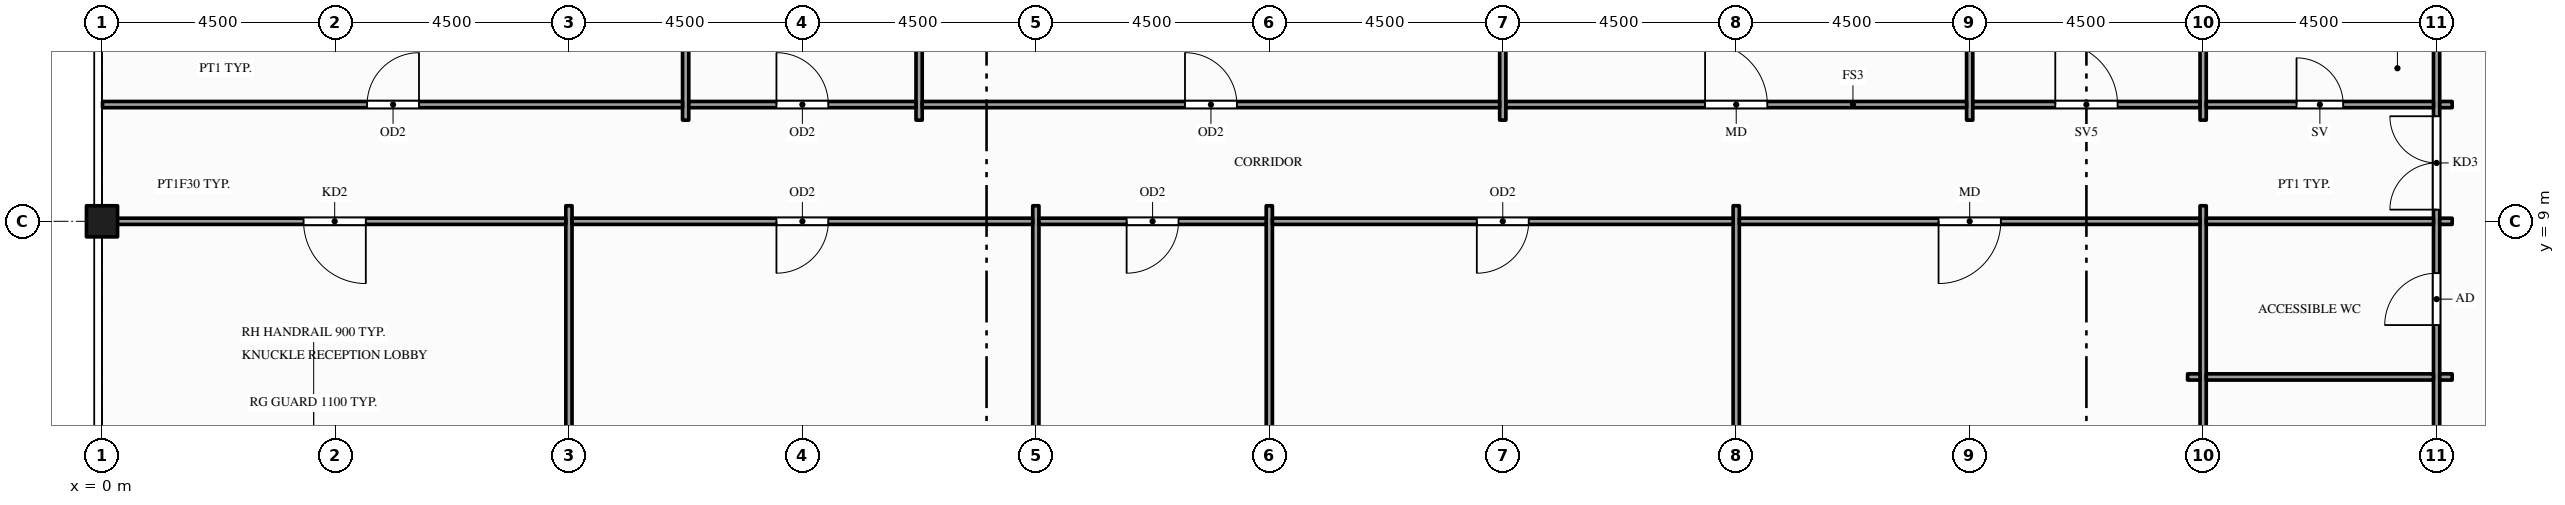
"""IFC4 building model, lengths in metres.
Left out: names, types, materials, properties, quantities, classifications, styles, units other than length and angle.
Written with IfcOpenShell. Run it as: python <this file> out.ifc"""

import sys

from ifc_helpers import new_model, si_unit, direction, frame, frame_2d, origin, origin_2d, place, context, subcontext, project, spatial, rectangle, hollow_rectangle, extrude, element, fill, save


model = new_model("IFC4")
c1 = context("Model", 3, precision=1e-05, world=origin(), true_north=direction((0.0, 1.0)))
c2 = subcontext(c1, "Body", "Model", "MODEL_VIEW")
j1 = project(units=[si_unit("LENGTHUNIT", "METRE"), si_unit("PLANEANGLEUNIT", "RADIAN")], contexts=[c1])
p1 = place(None, origin())
s1 = spatial("IfcSite", under=j1, at=p1, CompositionType="ELEMENT")
p2 = place(p1, origin())
s2 = spatial("IfcBuilding", under=s1, at=p2, CompositionType="ELEMENT")
p3 = place(p2, frame((0.0, 0.0, 305.0)))
s3 = spatial("IfcBuildingStorey", under=s2, at=p3, CompositionType="ELEMENT", Elevation=305.0)
p4 = place(p3, frame((0.0, 9.0, -0.15), z_axis=(0.0, 0.0, 1.0), x_axis=(1.0, 0.0, 0.0)))
e1 = element("IfcColumn", 1, at=p4, inside=s3, PredefinedType="COLUMN", context=c2, shape_type="SweptSolid", body=[
    extrude(hollow_rectangle(XDim=0.6, YDim=0.6, WallThickness=0.03, at=origin_2d()), origin(), (0.0, 0.0, 1.0), 4.5),
])
p5 = place(p3, frame((9.0, 3.875, 0.0), z_axis=(0.0, 0.0, 1.0), x_axis=(0.0, 1.0, 0.0)))
e2 = element("IfcWall", 2, at=p5, inside=s3, PredefinedType="PARTITIONING", context=c2, shape_type="SweptSolid", body=[
    extrude(rectangle(XDim=5.425, YDim=0.12, at=frame_2d((2.712, 0.0))), origin(), (0.0, 0.0, 1.0), 3.359),
])
for number, where, z_axis, x_axis in (
    (3, (11.25, 10.95, 0.0), (0.0, 0.0, 1.0), (0.0, 1.0, 0.0)),
    (4, (15.75, 10.95, 0.0), (0.0, 0.0, 1.0), (0.0, 1.0, 0.0)),
):
    element("IfcWall", number, at=place(p3, frame(where, z_axis=z_axis, x_axis=x_axis)), inside=s3, PredefinedType="PARTITIONING", context=c2, shape_type="SweptSolid", body=[
        extrude(rectangle(XDim=11.54, YDim=0.12, at=frame_2d((5.77, 0.0))), origin(), (0.0, 0.0, 1.0), 3.359),
    ])
for number, where, z_axis, x_axis in (
    (5, (18.0, 0.01, 0.0), (0.0, 0.0, 1.0), (0.0, 1.0, 0.0)),
    (6, (22.5, 0.01, 0.0), (0.0, 0.0, 1.0), (0.0, 1.0, 0.0)),
):
    element("IfcWall", number, at=place(p3, frame(where, z_axis=z_axis, x_axis=x_axis)), inside=s3, PredefinedType="PARTITIONING", context=c2, shape_type="SweptSolid", body=[
        extrude(rectangle(XDim=9.29, YDim=0.12, at=frame_2d((4.645, 0.0))), origin(), (0.0, 0.0, 1.0), 3.359),
    ])
p6 = place(p3, frame((27.0, 10.95, 0.0), z_axis=(0.0, 0.0, 1.0), x_axis=(0.0, 1.0, 0.0)))
e7 = element("IfcWall", 7, at=p6, inside=s3, PredefinedType="PARTITIONING", context=c2, shape_type="SweptSolid", body=[
    extrude(rectangle(XDim=11.54, YDim=0.12, at=frame_2d((5.77, 0.0))), origin(), (0.0, 0.0, 1.0), 3.359),
])
p7 = place(p3, frame((31.5, 0.01, 0.0), z_axis=(0.0, 0.0, 1.0), x_axis=(0.0, 1.0, 0.0)))
e8 = element("IfcWall", 8, at=p7, inside=s3, PredefinedType="PARTITIONING", context=c2, shape_type="SweptSolid", body=[
    extrude(rectangle(XDim=9.29, YDim=0.12, at=frame_2d((4.645, 0.0))), origin(), (0.0, 0.0, 1.0), 3.359),
])
p8 = place(p3, frame((36.0, 10.95, 0.0), z_axis=(0.0, 0.0, 1.0), x_axis=(0.0, 1.0, 0.0)))
e9 = element("IfcWall", 9, at=p8, inside=s3, PredefinedType="PARTITIONING", context=c2, shape_type="SweptSolid", body=[
    extrude(rectangle(XDim=11.54, YDim=0.12, at=frame_2d((5.77, 0.0))), origin(), (0.0, 0.0, 1.0), 3.359),
])
p9 = place(p3, frame((40.5, 0.01, 0.0), z_axis=(0.0, 0.0, 1.0), x_axis=(0.0, 1.0, 0.0)))
e10 = element("IfcWall", 10, at=p9, inside=s3, PredefinedType="PARTITIONING", context=c2, shape_type="SweptSolid", body=[
    extrude(rectangle(XDim=9.29, YDim=0.12, at=frame_2d((4.645, 0.0))), origin(), (0.0, 0.0, 1.0), 3.359),
])
p10 = place(p3, frame((40.5, 10.95, 0.0), z_axis=(0.0, 0.0, 1.0), x_axis=(0.0, 1.0, 0.0)))
e11 = element("IfcWall", 11, at=p10, inside=s3, PredefinedType="PARTITIONING", context=c2, shape_type="SweptSolid", body=[
    extrude(rectangle(XDim=11.54, YDim=0.12, at=frame_2d((5.77, 0.0))), origin(), (0.0, 0.0, 1.0), 3.359),
])
p11 = place(p3, frame((45.0, 0.01, 0.0), z_axis=(0.0, 0.0, 1.0), x_axis=(0.0, 1.0, 0.0)))
e12 = element("IfcWall", 12, at=p11, inside=s3, PredefinedType="PARTITIONING", context=c2, shape_type="SweptSolid", body=[
    extrude(rectangle(XDim=22.48, YDim=0.12, at=frame_2d((11.24, 0.0))), origin(), (0.0, 0.0, 1.0), 3.359),
])
p12 = place(p11, frame((9.215, 0.0, 0.0)))
e13 = element("IfcOpeningElement", 13, at=p12, cuts=e12, PredefinedType="OPENING", context=c2, shape_type="SweptSolid", body=[
    extrude(rectangle(XDim=1.8, YDim=2.1, at=frame_2d((0.9, 1.05))), frame((0.0, 0.07, 0.0), z_axis=(0.0, -1.0, 0.0), x_axis=(1.0, 0.0, 0.0)), (0.0, 0.0, 1.0), 0.14),
])
p13 = place(p11, frame((0.99, 0.0, 0.0)))
e14 = element("IfcOpeningElement", 14, at=p13, cuts=e12, PredefinedType="OPENING", context=c2, shape_type="SweptSolid", body=[
    extrude(rectangle(XDim=0.9, YDim=2.1, at=frame_2d((0.45, 1.05))), frame((0.0, 0.07, 0.0), z_axis=(0.0, -1.0, 0.0), x_axis=(1.0, 0.0, 0.0)), (0.0, 0.0, 1.0), 0.14),
])
p14 = place(p11, frame((4.04, 0.0, 0.0)))
e15 = element("IfcOpeningElement", 15, at=p14, cuts=e12, PredefinedType="OPENING", context=c2, shape_type="SweptSolid", body=[
    extrude(rectangle(XDim=0.9, YDim=2.1, at=frame_2d((0.45, 1.05))), frame((0.0, 0.07, 0.0), z_axis=(0.0, -1.0, 0.0), x_axis=(1.0, 0.0, 0.0)), (0.0, 0.0, 1.0), 0.14),
])
p15 = place(p11, frame((6.99, 0.0, 0.0)))
e16 = element("IfcOpeningElement", 16, at=p15, cuts=e12, PredefinedType="OPENING", context=c2, shape_type="SweptSolid", body=[
    extrude(rectangle(XDim=1.0, YDim=2.1, at=frame_2d((0.5, 1.05))), frame((0.0, 0.07, 0.0), z_axis=(0.0, -1.0, 0.0), x_axis=(1.0, 0.0, 0.0)), (0.0, 0.0, 1.0), 0.14),
])
p16 = place(p3, frame((40.2, 6.0, 0.0), z_axis=(0.0, 0.0, 1.0), x_axis=(1.0, 0.0, 0.0)))
e17 = element("IfcWall", 17, at=p16, inside=s3, PredefinedType="PARTITIONING", context=c2, shape_type="SweptSolid", body=[
    extrude(rectangle(XDim=0.24, YDim=0.12, at=frame_2d((0.12, 0.0))), origin(), (0.0, 0.0, 1.0), 3.359),
])
p17 = place(p3, frame((40.56, 6.0, 0.0), z_axis=(0.0, 0.0, 1.0), x_axis=(1.0, 0.0, 0.0)))
e18 = element("IfcWall", 18, at=p17, inside=s3, PredefinedType="PARTITIONING", context=c2, shape_type="SweptSolid", body=[
    extrude(rectangle(XDim=4.38, YDim=0.12, at=frame_2d((2.19, 0.0))), origin(), (0.0, 0.0, 1.0), 3.359),
])
p18 = place(p3, frame((45.06, 6.0, 0.0), z_axis=(0.0, 0.0, 1.0), x_axis=(1.0, 0.0, 0.0)))
e19 = element("IfcWall", 19, at=p18, inside=s3, PredefinedType="PARTITIONING", context=c2, shape_type="SweptSolid", body=[
    extrude(rectangle(XDim=0.24, YDim=0.12, at=frame_2d((0.12, 0.0))), origin(), (0.0, 0.0, 1.0), 3.359),
])
p19 = place(p3, frame((0.01, 9.0, 0.0), z_axis=(0.0, 0.0, 1.0), x_axis=(1.0, 0.0, 0.0)))
e20 = element("IfcWall", 20, at=p19, inside=s3, PredefinedType="PARTITIONING", context=c2, shape_type="SweptSolid", body=[
    extrude(rectangle(XDim=8.93, YDim=0.12, at=frame_2d((4.465, 0.0))), origin(), (0.0, 0.0, 1.0), 3.359),
])
p20 = place(p19, frame((3.875, 0.0, 0.0)))
e21 = element("IfcOpeningElement", 21, at=p20, cuts=e20, PredefinedType="OPENING", context=c2, shape_type="SweptSolid", body=[
    extrude(rectangle(XDim=1.2, YDim=2.1, at=frame_2d((0.6, 1.05))), frame((0.0, 0.07, 0.0), z_axis=(0.0, -1.0, 0.0), x_axis=(1.0, 0.0, 0.0)), (0.0, 0.0, 1.0), 0.14),
])
p21 = place(p3, frame((9.06, 9.0, 0.0), z_axis=(0.0, 0.0, 1.0), x_axis=(1.0, 0.0, 0.0)))
e22 = element("IfcWall", 22, at=p21, inside=s3, PredefinedType="PARTITIONING", context=c2, shape_type="SweptSolid", body=[
    extrude(rectangle(XDim=8.88, YDim=0.12, at=frame_2d((4.44, 0.0))), origin(), (0.0, 0.0, 1.0), 3.359),
])
p22 = place(p21, frame((3.94, 0.0, 0.0)))
e23 = element("IfcOpeningElement", 23, at=p22, cuts=e22, PredefinedType="OPENING", context=c2, shape_type="SweptSolid", body=[
    extrude(rectangle(XDim=1.0, YDim=2.1, at=frame_2d((0.5, 1.05))), frame((0.0, 0.07, 0.0), z_axis=(0.0, -1.0, 0.0), x_axis=(1.0, 0.0, 0.0)), (0.0, 0.0, 1.0), 0.14),
])
p23 = place(p3, frame((18.06, 9.0, 0.0), z_axis=(0.0, 0.0, 1.0), x_axis=(1.0, 0.0, 0.0)))
e24 = element("IfcWall", 24, at=p23, inside=s3, PredefinedType="PARTITIONING", context=c2, shape_type="SweptSolid", body=[
    extrude(rectangle(XDim=4.38, YDim=0.12, at=frame_2d((2.19, 0.0))), origin(), (0.0, 0.0, 1.0), 3.359),
])
p24 = place(p23, frame((1.69, 0.0, 0.0)))
e25 = element("IfcOpeningElement", 25, at=p24, cuts=e24, PredefinedType="OPENING", context=c2, shape_type="SweptSolid", body=[
    extrude(rectangle(XDim=1.0, YDim=2.1, at=frame_2d((0.5, 1.05))), frame((0.0, 0.07, 0.0), z_axis=(0.0, -1.0, 0.0), x_axis=(1.0, 0.0, 0.0)), (0.0, 0.0, 1.0), 0.14),
])
p25 = place(p3, frame((22.56, 9.0, 0.0), z_axis=(0.0, 0.0, 1.0), x_axis=(1.0, 0.0, 0.0)))
e26 = element("IfcWall", 26, at=p25, inside=s3, PredefinedType="PARTITIONING", context=c2, shape_type="SweptSolid", body=[
    extrude(rectangle(XDim=8.88, YDim=0.12, at=frame_2d((4.44, 0.0))), origin(), (0.0, 0.0, 1.0), 3.359),
])
p26 = place(p25, frame((3.94, 0.0, 0.0)))
e27 = element("IfcOpeningElement", 27, at=p26, cuts=e26, PredefinedType="OPENING", context=c2, shape_type="SweptSolid", body=[
    extrude(rectangle(XDim=1.0, YDim=2.1, at=frame_2d((0.5, 1.05))), frame((0.0, 0.07, 0.0), z_axis=(0.0, -1.0, 0.0), x_axis=(1.0, 0.0, 0.0)), (0.0, 0.0, 1.0), 0.14),
])
p27 = place(p3, frame((31.56, 9.0, 0.0), z_axis=(0.0, 0.0, 1.0), x_axis=(1.0, 0.0, 0.0)))
e28 = element("IfcWall", 28, at=p27, inside=s3, PredefinedType="PARTITIONING", context=c2, shape_type="SweptSolid", body=[
    extrude(rectangle(XDim=8.88, YDim=0.12, at=frame_2d((4.44, 0.0))), origin(), (0.0, 0.0, 1.0), 3.359),
])
p28 = place(p27, frame((3.84, 0.0, 0.0)))
e29 = element("IfcOpeningElement", 29, at=p28, cuts=e28, PredefinedType="OPENING", context=c2, shape_type="SweptSolid", body=[
    extrude(rectangle(XDim=1.2, YDim=2.1, at=frame_2d((0.6, 1.05))), frame((0.0, 0.07, 0.0), z_axis=(0.0, -1.0, 0.0), x_axis=(1.0, 0.0, 0.0)), (0.0, 0.0, 1.0), 0.14),
])
p29 = place(p3, frame((40.56, 9.0, 0.0), z_axis=(0.0, 0.0, 1.0), x_axis=(1.0, 0.0, 0.0)))
e30 = element("IfcWall", 30, at=p29, inside=s3, PredefinedType="PARTITIONING", context=c2, shape_type="SweptSolid", body=[
    extrude(rectangle(XDim=4.38, YDim=0.12, at=frame_2d((2.19, 0.0))), origin(), (0.0, 0.0, 1.0), 3.359),
])
p30 = place(p3, frame((45.06, 9.0, 0.0), z_axis=(0.0, 0.0, 1.0), x_axis=(1.0, 0.0, 0.0)))
e31 = element("IfcWall", 31, at=p30, inside=s3, PredefinedType="PARTITIONING", context=c2, shape_type="SweptSolid", body=[
    extrude(rectangle(XDim=0.24, YDim=0.12, at=frame_2d((0.12, 0.0))), origin(), (0.0, 0.0, 1.0), 3.359),
])
p31 = place(p3, frame((0.01, 11.25, 0.0), z_axis=(0.0, 0.0, 1.0), x_axis=(1.0, 0.0, 0.0)))
e32 = element("IfcWall", 32, at=p31, inside=s3, PredefinedType="PARTITIONING", context=c2, shape_type="SweptSolid", body=[
    extrude(rectangle(XDim=11.18, YDim=0.12, at=frame_2d((5.59, 0.0))), origin(), (0.0, 0.0, 1.0), 3.359),
])
p32 = place(p31, frame((5.1, 0.0, 0.0)))
e33 = element("IfcOpeningElement", 33, at=p32, cuts=e32, PredefinedType="OPENING", context=c2, shape_type="SweptSolid", body=[
    extrude(rectangle(XDim=1.0, YDim=2.1, at=frame_2d((0.5, 1.05))), frame((0.0, 0.07, 0.0), z_axis=(0.0, -1.0, 0.0), x_axis=(1.0, 0.0, 0.0)), (0.0, 0.0, 1.0), 0.14),
])
p33 = place(p3, frame((11.31, 11.25, 0.0), z_axis=(0.0, 0.0, 1.0), x_axis=(1.0, 0.0, 0.0)))
e34 = element("IfcWall", 34, at=p33, inside=s3, PredefinedType="PARTITIONING", context=c2, shape_type="SweptSolid", body=[
    extrude(rectangle(XDim=4.38, YDim=0.12, at=frame_2d((2.19, 0.0))), origin(), (0.0, 0.0, 1.0), 3.359),
])
p34 = place(p33, frame((1.69, 0.0, 0.0)))
e35 = element("IfcOpeningElement", 35, at=p34, cuts=e34, PredefinedType="OPENING", context=c2, shape_type="SweptSolid", body=[
    extrude(rectangle(XDim=1.0, YDim=2.1, at=frame_2d((0.5, 1.05))), frame((0.0, 0.07, 0.0), z_axis=(0.0, -1.0, 0.0), x_axis=(1.0, 0.0, 0.0)), (0.0, 0.0, 1.0), 0.14),
])
p35 = place(p3, frame((15.81, 11.25, 0.0), z_axis=(0.0, 0.0, 1.0), x_axis=(1.0, 0.0, 0.0)))
e36 = element("IfcWall", 36, at=p35, inside=s3, PredefinedType="PARTITIONING", context=c2, shape_type="SweptSolid", body=[
    extrude(rectangle(XDim=11.13, YDim=0.12, at=frame_2d((5.565, 0.0))), origin(), (0.0, 0.0, 1.0), 3.359),
])
p36 = place(p35, frame((5.065, 0.0, 0.0)))
e37 = element("IfcOpeningElement", 37, at=p36, cuts=e36, PredefinedType="OPENING", context=c2, shape_type="SweptSolid", body=[
    extrude(rectangle(XDim=1.0, YDim=2.1, at=frame_2d((0.5, 1.05))), frame((0.0, 0.07, 0.0), z_axis=(0.0, -1.0, 0.0), x_axis=(1.0, 0.0, 0.0)), (0.0, 0.0, 1.0), 0.14),
])
p37 = place(p3, frame((27.06, 11.25, 0.0), z_axis=(0.0, 0.0, 1.0), x_axis=(1.0, 0.0, 0.0)))
e38 = element("IfcWall", 38, at=p37, inside=s3, PredefinedType="PARTITIONING", context=c2, shape_type="SweptSolid", body=[
    extrude(rectangle(XDim=8.88, YDim=0.12, at=frame_2d((4.44, 0.0))), origin(), (0.0, 0.0, 1.0), 3.359),
])
p38 = place(p37, frame((3.84, 0.0, 0.0)))
e39 = element("IfcOpeningElement", 39, at=p38, cuts=e38, PredefinedType="OPENING", context=c2, shape_type="SweptSolid", body=[
    extrude(rectangle(XDim=1.2, YDim=2.1, at=frame_2d((0.6, 1.05))), frame((0.0, 0.07, 0.0), z_axis=(0.0, -1.0, 0.0), x_axis=(1.0, 0.0, 0.0)), (0.0, 0.0, 1.0), 0.14),
])
p39 = place(p3, frame((36.06, 11.25, 0.0), z_axis=(0.0, 0.0, 1.0), x_axis=(1.0, 0.0, 0.0)))
e40 = element("IfcWall", 40, at=p39, inside=s3, PredefinedType="PARTITIONING", context=c2, shape_type="SweptSolid", body=[
    extrude(rectangle(XDim=4.38, YDim=0.12, at=frame_2d((2.19, 0.0))), origin(), (0.0, 0.0, 1.0), 3.359),
])
p40 = place(p39, frame((1.59, 0.0, 0.0)))
e41 = element("IfcOpeningElement", 41, at=p40, cuts=e40, PredefinedType="OPENING", context=c2, shape_type="SweptSolid", body=[
    extrude(rectangle(XDim=1.2, YDim=2.1, at=frame_2d((0.6, 1.05))), frame((0.0, 0.07, 0.0), z_axis=(0.0, -1.0, 0.0), x_axis=(1.0, 0.0, 0.0)), (0.0, 0.0, 1.0), 0.14),
])
p41 = place(p3, frame((40.56, 11.25, 0.0), z_axis=(0.0, 0.0, 1.0), x_axis=(1.0, 0.0, 0.0)))
e42 = element("IfcWall", 42, at=p41, inside=s3, PredefinedType="PARTITIONING", context=c2, shape_type="SweptSolid", body=[
    extrude(rectangle(XDim=4.38, YDim=0.12, at=frame_2d((2.19, 0.0))), origin(), (0.0, 0.0, 1.0), 3.359),
])
p42 = place(p41, frame((1.74, 0.0, 0.0)))
e43 = element("IfcOpeningElement", 43, at=p42, cuts=e42, PredefinedType="OPENING", context=c2, shape_type="SweptSolid", body=[
    extrude(rectangle(XDim=0.9, YDim=2.1, at=frame_2d((0.45, 1.05))), frame((0.0, 0.07, 0.0), z_axis=(0.0, -1.0, 0.0), x_axis=(1.0, 0.0, 0.0)), (0.0, 0.0, 1.0), 0.14),
])
p43 = place(p3, frame((45.06, 11.25, 0.0), z_axis=(0.0, 0.0, 1.0), x_axis=(1.0, 0.0, 0.0)))
e44 = element("IfcWall", 44, at=p43, inside=s3, PredefinedType="PARTITIONING", context=c2, shape_type="SweptSolid", body=[
    extrude(rectangle(XDim=0.24, YDim=0.12, at=frame_2d((0.12, 0.0))), origin(), (0.0, 0.0, 1.0), 3.359),
])
p44 = place(p12, origin())
e45 = element("IfcDoor", 45, at=p44, inside=s3, OperationType="DOUBLE_DOOR_SINGLE_SWING", PredefinedType="DOOR", context=c2, shape_type="SweptSolid", body=[
    extrude(rectangle(XDim=1.8, YDim=2.1, at=frame_2d((0.9, 1.05))), frame((0.0, 0.025, 0.0), z_axis=(0.0, -1.0, 0.0), x_axis=(1.0, 0.0, 0.0)), (0.0, 0.0, 1.0), 0.05),
])
fill(e13, e45)
p45 = place(p20, origin())
e46 = element("IfcDoor", 46, at=p45, inside=s3, OperationType="SINGLE_SWING_RIGHT", PredefinedType="DOOR", context=c2, shape_type="SweptSolid", body=[
    extrude(rectangle(XDim=1.2, YDim=2.1, at=frame_2d((0.6, 1.05))), frame((0.0, 0.025, 0.0), z_axis=(0.0, -1.0, 0.0), x_axis=(1.0, 0.0, 0.0)), (0.0, 0.0, 1.0), 0.05),
])
fill(e21, e46)
p46 = place(p22, origin())
e47 = element("IfcDoor", 47, at=p46, inside=s3, OperationType="SINGLE_SWING_LEFT", PredefinedType="DOOR", context=c2, shape_type="SweptSolid", body=[
    extrude(rectangle(XDim=1.0, YDim=2.1, at=frame_2d((0.5, 1.05))), frame((0.0, 0.025, 0.0), z_axis=(0.0, -1.0, 0.0), x_axis=(1.0, 0.0, 0.0)), (0.0, 0.0, 1.0), 0.05),
])
fill(e23, e47)
p47 = place(p24, origin())
e48 = element("IfcDoor", 48, at=p47, inside=s3, OperationType="SINGLE_SWING_LEFT", PredefinedType="DOOR", context=c2, shape_type="SweptSolid", body=[
    extrude(rectangle(XDim=1.0, YDim=2.1, at=frame_2d((0.5, 1.05))), frame((0.0, 0.025, 0.0), z_axis=(0.0, -1.0, 0.0), x_axis=(1.0, 0.0, 0.0)), (0.0, 0.0, 1.0), 0.05),
])
fill(e25, e48)
p48 = place(p26, origin())
e49 = element("IfcDoor", 49, at=p48, inside=s3, OperationType="SINGLE_SWING_LEFT", PredefinedType="DOOR", context=c2, shape_type="SweptSolid", body=[
    extrude(rectangle(XDim=1.0, YDim=2.1, at=frame_2d((0.5, 1.05))), frame((0.0, 0.025, 0.0), z_axis=(0.0, -1.0, 0.0), x_axis=(1.0, 0.0, 0.0)), (0.0, 0.0, 1.0), 0.05),
])
fill(e27, e49)
p49 = place(p28, origin())
e50 = element("IfcDoor", 50, at=p49, inside=s3, OperationType="SINGLE_SWING_LEFT", PredefinedType="DOOR", context=c2, shape_type="SweptSolid", body=[
    extrude(rectangle(XDim=1.2, YDim=2.1, at=frame_2d((0.6, 1.05))), frame((0.0, 0.025, 0.0), z_axis=(0.0, -1.0, 0.0), x_axis=(1.0, 0.0, 0.0)), (0.0, 0.0, 1.0), 0.05),
])
fill(e29, e50)
p50 = place(p15, origin())
e51 = element("IfcDoor", 51, at=p50, inside=s3, OperationType="SINGLE_SWING_LEFT", PredefinedType="DOOR", context=c2, shape_type="SweptSolid", body=[
    extrude(rectangle(XDim=1.0, YDim=2.1, at=frame_2d((0.5, 1.05))), frame((0.0, 0.025, 0.0), z_axis=(0.0, -1.0, 0.0), x_axis=(1.0, 0.0, 0.0)), (0.0, 0.0, 1.0), 0.05),
])
fill(e16, e51)
p51 = place(p32, origin())
e52 = element("IfcDoor", 52, at=p51, inside=s3, OperationType="SINGLE_SWING_RIGHT", PredefinedType="DOOR", context=c2, shape_type="SweptSolid", body=[
    extrude(rectangle(XDim=1.0, YDim=2.1, at=frame_2d((0.5, 1.05))), frame((0.0, 0.025, 0.0), z_axis=(0.0, -1.0, 0.0), x_axis=(1.0, 0.0, 0.0)), (0.0, 0.0, 1.0), 0.05),
])
fill(e33, e52)
p52 = place(p34, origin())
e53 = element("IfcDoor", 53, at=p52, inside=s3, OperationType="SINGLE_SWING_LEFT", PredefinedType="DOOR", context=c2, shape_type="SweptSolid", body=[
    extrude(rectangle(XDim=1.0, YDim=2.1, at=frame_2d((0.5, 1.05))), frame((0.0, 0.025, 0.0), z_axis=(0.0, -1.0, 0.0), x_axis=(1.0, 0.0, 0.0)), (0.0, 0.0, 1.0), 0.05),
])
fill(e35, e53)
p53 = place(p36, origin())
e54 = element("IfcDoor", 54, at=p53, inside=s3, OperationType="SINGLE_SWING_LEFT", PredefinedType="DOOR", context=c2, shape_type="SweptSolid", body=[
    extrude(rectangle(XDim=1.0, YDim=2.1, at=frame_2d((0.5, 1.05))), frame((0.0, 0.025, 0.0), z_axis=(0.0, -1.0, 0.0), x_axis=(1.0, 0.0, 0.0)), (0.0, 0.0, 1.0), 0.05),
])
fill(e37, e54)
p54 = place(p38, origin())
e55 = element("IfcDoor", 55, at=p54, inside=s3, OperationType="SINGLE_SWING_LEFT", PredefinedType="DOOR", context=c2, shape_type="SweptSolid", body=[
    extrude(rectangle(XDim=1.2, YDim=2.1, at=frame_2d((0.6, 1.05))), frame((0.0, 0.025, 0.0), z_axis=(0.0, -1.0, 0.0), x_axis=(1.0, 0.0, 0.0)), (0.0, 0.0, 1.0), 0.05),
])
fill(e39, e55)
p55 = place(p40, origin())
e56 = element("IfcDoor", 56, at=p55, inside=s3, OperationType="SINGLE_SWING_LEFT", PredefinedType="DOOR", context=c2, shape_type="SweptSolid", body=[
    extrude(rectangle(XDim=1.2, YDim=2.1, at=frame_2d((0.6, 1.05))), frame((0.0, 0.025, 0.0), z_axis=(0.0, -1.0, 0.0), x_axis=(1.0, 0.0, 0.0)), (0.0, 0.0, 1.0), 0.05),
])
fill(e41, e56)
p56 = place(p42, origin())
e57 = element("IfcDoor", 57, at=p56, inside=s3, OperationType="SINGLE_SWING_LEFT", PredefinedType="DOOR", context=c2, shape_type="SweptSolid", body=[
    extrude(rectangle(XDim=0.9, YDim=2.1, at=frame_2d((0.45, 1.05))), frame((0.0, 0.025, 0.0), z_axis=(0.0, -1.0, 0.0), x_axis=(1.0, 0.0, 0.0)), (0.0, 0.0, 1.0), 0.05),
])
fill(e43, e57)
save(model, sys.argv[1])
